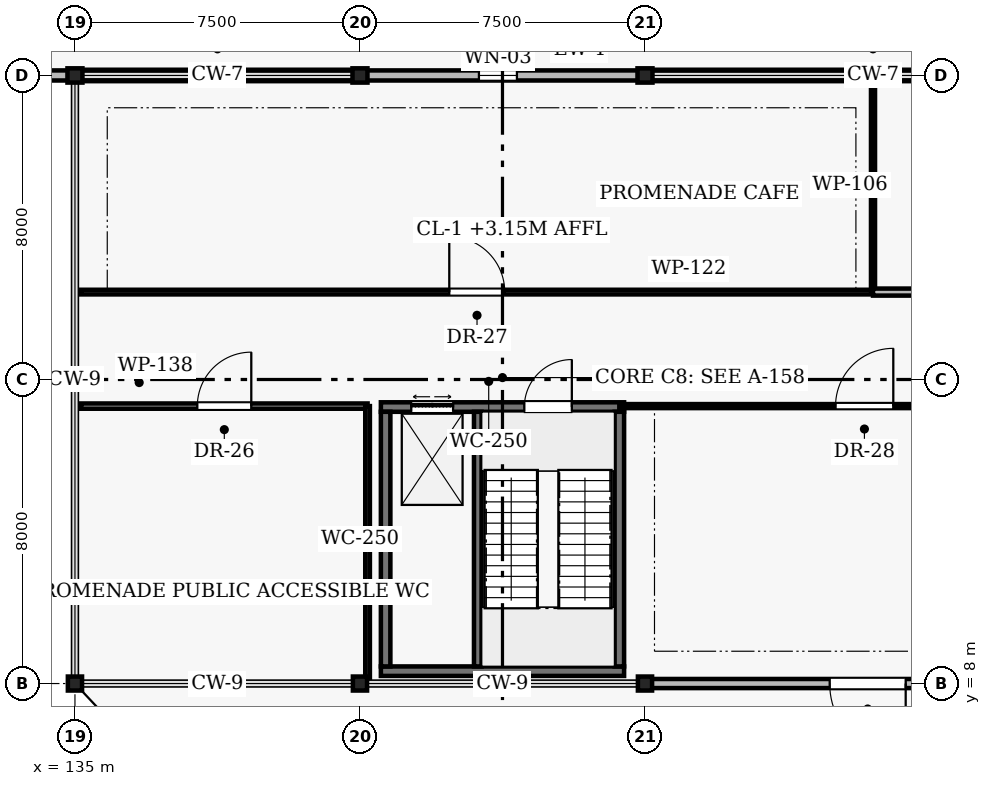
"""IFC4 building model, lengths in metres.
Left out: names, types, materials, properties, quantities, classifications, styles, units other than length and angle.
Written with IfcOpenShell. Run it as: python <this file> out.ifc"""

import sys

from ifc_helpers import new_model, si_unit, direction, frame, frame_2d, origin, origin_2d, place, context, subcontext, project, spatial, rectangle, i_section, extrude, element, fill, save


model = new_model("IFC4")
c1 = context("Model", 3, precision=1e-05, world=origin(), true_north=direction((0.0, 1.0)))
c2 = subcontext(c1, "Body", "Model", "MODEL_VIEW")
j1 = project(units=[si_unit("LENGTHUNIT", "METRE"), si_unit("PLANEANGLEUNIT", "RADIAN")], contexts=[c1])
p1 = place(None, origin())
s1 = spatial("IfcSite", under=j1, at=p1, CompositionType="ELEMENT")
p2 = place(p1, origin())
s2 = spatial("IfcBuilding", under=s1, at=p2, CompositionType="ELEMENT")
p3 = place(p2, origin())
s3 = spatial("IfcBuildingStorey", under=s2, at=p3, CompositionType="ELEMENT", Elevation=0.0)
p4 = place(p3, frame((135.0, 8.0, 0.0), z_axis=(0.0, 0.0, 1.0), x_axis=(1.0, 0.0, 0.0)))
e1 = element("IfcColumn", 1, at=p4, inside=s3, PredefinedType="COLUMN", context=c2, shape_type="SweptSolid", body=[
    extrude(i_section(OverallWidth=0.373, OverallDepth=0.368, WebThickness=0.015, FlangeThickness=0.024, FilletRadius=0.015, at=origin_2d()), origin(), (0.0, 0.0, 1.0), 4.5),
])
p5 = place(p3, frame((135.0, 24.0, 0.0), z_axis=(0.0, 0.0, 1.0), x_axis=(1.0, 0.0, 0.0)))
e2 = element("IfcColumn", 2, at=p5, inside=s3, PredefinedType="COLUMN", context=c2, shape_type="SweptSolid", body=[
    extrude(i_section(OverallWidth=0.394, OverallDepth=0.375, WebThickness=0.021, FlangeThickness=0.033, FilletRadius=0.018, at=origin_2d()), origin(), (0.0, 0.0, 1.0), 4.5),
])
p6 = place(p3, frame((142.5, 8.0, 0.0), z_axis=(0.0, 0.0, 1.0), x_axis=(1.0, 0.0, 0.0)))
e3 = element("IfcColumn", 3, at=p6, inside=s3, PredefinedType="COLUMN", context=c2, shape_type="SweptSolid", body=[
    extrude(i_section(OverallWidth=0.373, OverallDepth=0.368, WebThickness=0.015, FlangeThickness=0.024, FilletRadius=0.015, at=origin_2d()), origin(), (0.0, 0.0, 1.0), 4.5),
])
p7 = place(p3, frame((142.5, 24.0, 0.0), z_axis=(0.0, 0.0, 1.0), x_axis=(1.0, 0.0, 0.0)))
e4 = element("IfcColumn", 4, at=p7, inside=s3, PredefinedType="COLUMN", context=c2, shape_type="SweptSolid", body=[
    extrude(i_section(OverallWidth=0.394, OverallDepth=0.375, WebThickness=0.021, FlangeThickness=0.033, FilletRadius=0.018, at=origin_2d()), origin(), (0.0, 0.0, 1.0), 4.5),
])
p8 = place(p3, frame((150.0, 8.0, 0.0), z_axis=(0.0, 0.0, 1.0), x_axis=(1.0, 0.0, 0.0)))
e5 = element("IfcColumn", 5, at=p8, inside=s3, PredefinedType="COLUMN", context=c2, shape_type="SweptSolid", body=[
    extrude(i_section(OverallWidth=0.373, OverallDepth=0.368, WebThickness=0.015, FlangeThickness=0.024, FilletRadius=0.015, at=origin_2d()), origin(), (0.0, 0.0, 1.0), 4.5),
])
p9 = place(p3, frame((150.0, 24.0, 0.0), z_axis=(0.0, 0.0, 1.0), x_axis=(1.0, 0.0, 0.0)))
e6 = element("IfcColumn", 6, at=p9, inside=s3, PredefinedType="COLUMN", context=c2, shape_type="SweptSolid", body=[
    extrude(i_section(OverallWidth=0.394, OverallDepth=0.375, WebThickness=0.021, FlangeThickness=0.033, FilletRadius=0.018, at=origin_2d()), origin(), (0.0, 0.0, 1.0), 4.5),
])
p10 = place(p3, frame((127.58, 24.0, 0.0), z_axis=(0.0, 0.0, 1.0), x_axis=(1.0, 0.0, 0.0)))
e7 = element("IfcWall", 7, at=p10, inside=s3, PredefinedType="SOLIDWALL", context=c2, shape_type="SweptSolid", body=[
    extrude(rectangle(XDim=7.34, YDim=0.265, at=frame_2d((3.67, 0.0))), origin(), (0.0, 0.0, 1.0), 3.298),
])
p11 = place(p10, frame((3.1, 0.0, 1.2)))
e8 = element("IfcOpeningElement", 8, at=p11, cuts=e7, PredefinedType="OPENING", context=c2, shape_type="SweptSolid", body=[
    extrude(rectangle(XDim=0.9, YDim=1.5, at=frame_2d((0.45, 0.75))), frame((0.0, 0.142, 0.0), z_axis=(0.0, -1.0, 0.0), x_axis=(1.0, 0.0, 0.0)), (0.0, 0.0, 1.0), 0.285),
])
p12 = place(p3, frame((135.08, 24.0, 0.0), z_axis=(0.0, 0.0, 1.0), x_axis=(1.0, 0.0, 0.0)))
e9 = element("IfcWall", 9, at=p12, inside=s3, PredefinedType="SOLIDWALL", context=c2, shape_type="SweptSolid", body=[
    extrude(rectangle(XDim=7.34, YDim=0.3, at=frame_2d((3.67, 0.0))), origin(), (0.0, 0.0, 1.0), 1.1),
])
p13 = place(p3, frame((142.58, 24.0, 0.0), z_axis=(0.0, 0.0, 1.0), x_axis=(1.0, 0.0, 0.0)))
e10 = element("IfcWall", 10, at=p13, inside=s3, PredefinedType="SOLIDWALL", context=c2, shape_type="SweptSolid", body=[
    extrude(rectangle(XDim=7.34, YDim=0.265, at=frame_2d((3.67, 0.0))), origin(), (0.0, 0.0, 1.0), 3.8),
])
p14 = place(p13, frame((3.05, 0.0, 1.2)))
e11 = element("IfcOpeningElement", 11, at=p14, cuts=e10, PredefinedType="OPENING", context=c2, shape_type="SweptSolid", body=[
    extrude(rectangle(XDim=1.0, YDim=1.2, at=frame_2d((0.5, 0.6))), frame((0.0, 0.142, 0.0), z_axis=(0.0, -1.0, 0.0), x_axis=(1.0, 0.0, 0.0)), (0.0, 0.0, 1.0), 0.285),
])
p15 = place(p3, frame((150.08, 24.0, 0.0), z_axis=(0.0, 0.0, 1.0), x_axis=(1.0, 0.0, 0.0)))
e12 = element("IfcWall", 12, at=p15, inside=s3, PredefinedType="SOLIDWALL", context=c2, shape_type="SweptSolid", body=[
    extrude(rectangle(XDim=11.84, YDim=0.3, at=frame_2d((5.92, 0.0))), origin(), (0.0, 0.0, 1.0), 1.1),
])
p16 = place(p3, frame((150.08, 8.0, 0.0), z_axis=(0.0, 0.0, 1.0), x_axis=(1.0, 0.0, 0.0)))
e13 = element("IfcWall", 13, at=p16, inside=s3, PredefinedType="SOLIDWALL", context=c2, shape_type="SweptSolid", body=[
    extrude(rectangle(XDim=11.84, YDim=0.24, at=frame_2d((5.92, 0.0))), origin(), (0.0, 0.0, 1.0), 3.75),
])
p17 = place(p16, frame((4.78, 0.0, 0.0)))
e14 = element("IfcOpeningElement", 14, at=p17, cuts=e13, PredefinedType="OPENING", context=c2, shape_type="SweptSolid", body=[
    extrude(rectangle(XDim=2.0, YDim=2.2, at=frame_2d((1.0, 1.1))), frame((0.0, 0.13, 0.0), z_axis=(0.0, -1.0, 0.0), x_axis=(1.0, 0.0, 0.0)), (0.0, 0.0, 1.0), 0.26),
])
p18 = place(p3, frame((143.05, 8.325, 0.0), z_axis=(0.0, 0.0, 1.0), x_axis=(1.0, 0.0, 0.0)))
e15 = element("IfcWall", 15, at=p18, inside=s3, PredefinedType="SHEAR", context=c2, shape_type="SweptSolid", body=[
    extrude(rectangle(XDim=6.4, YDim=0.25, at=frame_2d((3.2, 0.0))), origin(), (0.0, 0.0, 1.0), 4.5),
])
p19 = place(p3, frame((143.05, 15.275, 0.0), z_axis=(0.0, 0.0, 1.0), x_axis=(1.0, 0.0, 0.0)))
e16 = element("IfcWall", 16, at=p19, inside=s3, PredefinedType="SHEAR", context=c2, shape_type="SweptSolid", body=[
    extrude(rectangle(XDim=6.4, YDim=0.25, at=frame_2d((3.2, 0.0))), origin(), (0.0, 0.0, 1.0), 4.5),
])
p20 = place(p19, frame((0.8, 0.0, 0.0)))
e17 = element("IfcOpeningElement", 17, at=p20, cuts=e16, PredefinedType="OPENING", context=c2, shape_type="SweptSolid", body=[
    extrude(rectangle(XDim=1.1, YDim=2.15, at=frame_2d((0.55, 1.075))), frame((0.0, 0.135, 0.0), z_axis=(0.0, -1.0, 0.0), x_axis=(1.0, 0.0, 0.0)), (0.0, 0.0, 1.0), 0.27),
])
p21 = place(p19, frame((3.775, 0.0, 0.0)))
e18 = element("IfcOpeningElement", 18, at=p21, cuts=e16, PredefinedType="OPENING", context=c2, shape_type="SweptSolid", body=[
    extrude(rectangle(XDim=1.25, YDim=2.15, at=frame_2d((0.625, 1.075))), frame((0.0, 0.135, 0.0), z_axis=(0.0, -1.0, 0.0), x_axis=(1.0, 0.0, 0.0)), (0.0, 0.0, 1.0), 0.27),
])
for number, where, z_axis, x_axis in (
    (19, (143.175, 8.45, 0.0), (0.0, 0.0, 1.0), (0.0, 1.0, 0.0)),
    (20, (149.325, 8.45, 0.0), (0.0, 0.0, 1.0), (0.0, 1.0, 0.0)),
):
    element("IfcWall", number, at=place(p3, frame(where, z_axis=z_axis, x_axis=x_axis)), inside=s3, PredefinedType="SHEAR", context=c2, shape_type="SweptSolid", body=[
        extrude(rectangle(XDim=6.7, YDim=0.25, at=frame_2d((3.35, 0.0))), origin(), (0.0, 0.0, 1.0), 4.5),
    ])
p22 = place(p3, frame((145.6, 8.45, 0.0), z_axis=(0.0, 0.0, 1.0), x_axis=(0.0, 1.0, 0.0)))
e21 = element("IfcWall", 21, at=p22, inside=s3, PredefinedType="SHEAR", context=c2, shape_type="SweptSolid", body=[
    extrude(rectangle(XDim=6.7, YDim=0.2, at=frame_2d((3.35, 0.0))), origin(), (0.0, 0.0, 1.0), 4.5),
])
p23 = place(p3, frame((135.16, 15.3, 0.0), z_axis=(0.0, 0.0, 1.0), x_axis=(1.0, 0.0, 0.0)))
e22 = element("IfcWall", 22, at=p23, inside=s3, PredefinedType="PARTITIONING", context=c2, shape_type="SweptSolid", body=[
    extrude(rectangle(XDim=7.54, YDim=0.138, at=frame_2d((3.77, 0.0))), origin(), (0.0, 0.0, 1.0), 3.7),
])
p24 = place(p23, frame((3.06, 0.0, 0.0)))
e23 = element("IfcOpeningElement", 23, at=p24, cuts=e22, PredefinedType="OPENING", context=c2, shape_type="SweptSolid", body=[
    extrude(rectangle(XDim=1.42, YDim=2.18, at=frame_2d((0.71, 1.09))), frame((0.0, 0.079, 0.0), z_axis=(0.0, -1.0, 0.0), x_axis=(1.0, 0.0, 0.0)), (0.0, 0.0, 1.0), 0.158),
])
p25 = place(p3, frame((142.7, 8.05, 0.0), z_axis=(0.0, 0.0, 1.0), x_axis=(0.0, 1.0, 0.0)))
e24 = element("IfcWall", 24, at=p25, inside=s3, PredefinedType="PARTITIONING", context=c2, shape_type="SweptSolid", body=[
    extrude(rectangle(XDim=7.25, YDim=0.122, at=frame_2d((3.625, 0.0))), origin(), (0.0, 0.0, 1.0), 3.581),
])
p26 = place(p3, frame((135.16, 18.3, 0.0), z_axis=(0.0, 0.0, 1.0), x_axis=(1.0, 0.0, 0.0)))
e25 = element("IfcWall", 25, at=p26, inside=s3, PredefinedType="PARTITIONING", context=c2, shape_type="SweptSolid", body=[
    extrude(rectangle(XDim=20.84, YDim=0.122, at=frame_2d((10.42, 0.0))), origin(), (0.0, 0.0, 1.0), 3.7),
])
p27 = place(p26, frame((9.69, 0.0, 0.0)))
e26 = element("IfcOpeningElement", 26, at=p27, cuts=e25, PredefinedType="OPENING", context=c2, shape_type="SweptSolid", body=[
    extrude(rectangle(XDim=1.46, YDim=2.2, at=frame_2d((0.73, 1.1))), frame((0.0, 0.071, 0.0), z_axis=(0.0, -1.0, 0.0), x_axis=(1.0, 0.0, 0.0)), (0.0, 0.0, 1.0), 0.142),
])
p28 = place(p3, frame((156.0, 18.3, 0.0), z_axis=(0.0, 0.0, 1.0), x_axis=(0.0, 1.0, 0.0)))
e27 = element("IfcWall", 27, at=p28, inside=s3, PredefinedType="PARTITIONING", context=c2, shape_type="SweptSolid", body=[
    extrude(rectangle(XDim=5.62, YDim=0.106, at=frame_2d((2.81, 0.0))), origin(), (0.0, 0.0, 1.0), 3.7),
])
p29 = place(p3, frame((149.325, 15.3, 0.0), z_axis=(0.0, 0.0, 1.0), x_axis=(1.0, 0.0, 0.0)))
e28 = element("IfcWall", 28, at=p29, inside=s3, PredefinedType="PARTITIONING", context=c2, shape_type="SweptSolid", body=[
    extrude(rectangle(XDim=24.275, YDim=0.106, at=frame_2d((12.138, 0.0))), origin(), (0.0, 0.0, 1.0), 3.7),
])
p30 = place(p29, frame((5.689, 0.0, 0.0)))
e29 = element("IfcOpeningElement", 29, at=p30, cuts=e28, PredefinedType="OPENING", context=c2, shape_type="SweptSolid", body=[
    extrude(rectangle(XDim=1.52, YDim=2.18, at=frame_2d((0.76, 1.09))), frame((0.0, 0.063, 0.0), z_axis=(0.0, -1.0, 0.0), x_axis=(1.0, 0.0, 0.0)), (0.0, 0.0, 1.0), 0.126),
])
p31 = place(p3, frame((156.0, 18.3, 0.0), z_axis=(0.0, 0.0, 1.0), x_axis=(1.0, 0.0, 0.0)))
e30 = element("IfcWall", 30, at=p31, inside=s3, PredefinedType="PARTITIONING", context=c2, shape_type="SweptSolid", body=[
    extrude(rectangle(XDim=29.84, YDim=0.185, at=frame_2d((14.92, 0.0))), origin(), (0.0, 0.0, 1.0), 3.7),
])
p32 = place(p31, frame((10.746, 0.0, 0.0)))
e31 = element("IfcOpeningElement", 31, at=p32, cuts=e30, PredefinedType="OPENING", context=c2, shape_type="SweptSolid", body=[
    extrude(rectangle(XDim=1.56, YDim=2.2, at=frame_2d((0.78, 1.1))), frame((0.0, 0.103, 0.0), z_axis=(0.0, -1.0, 0.0), x_axis=(1.0, 0.0, 0.0)), (0.0, 0.0, 1.0), 0.205),
])
p33 = place(p14, origin())
e32 = element("IfcWindow", 32, at=p33, inside=s3, PartitioningType="SINGLE_PANEL", PredefinedType="WINDOW", context=c2, shape_type="SweptSolid", body=[
    extrude(rectangle(XDim=1.0, YDim=1.2, at=frame_2d((0.5, 0.6))), frame((0.0, 0.03, 0.0), z_axis=(0.0, -1.0, 0.0), x_axis=(1.0, 0.0, 0.0)), (0.0, 0.0, 1.0), 0.06),
])
fill(e11, e32)
p34 = place(p17, frame((2.0, 0.0, 0.0), z_axis=(0.0, 0.0, 1.0), x_axis=(-1.0, 0.0, 0.0)))
e33 = element("IfcDoor", 33, at=p34, inside=s3, OperationType="SINGLE_SWING_LEFT", PredefinedType="DOOR", context=c2, shape_type="SweptSolid", body=[
    extrude(rectangle(XDim=2.0, YDim=2.2, at=frame_2d((1.0, 1.1))), frame((0.0, 0.025, 0.0), z_axis=(0.0, -1.0, 0.0), x_axis=(1.0, 0.0, 0.0)), (0.0, 0.0, 1.0), 0.05),
])
fill(e14, e33)
p35 = place(p20, origin())
e34 = element("IfcDoor", 34, at=p35, inside=s3, OperationType="DOUBLE_DOOR_SLIDING", PredefinedType="DOOR", context=c2, shape_type="SweptSolid", body=[
    extrude(rectangle(XDim=1.1, YDim=2.15, at=frame_2d((0.55, 1.075))), frame((0.0, 0.025, 0.0), z_axis=(0.0, -1.0, 0.0), x_axis=(1.0, 0.0, 0.0)), (0.0, 0.0, 1.0), 0.05),
])
fill(e17, e34)
p36 = place(p21, origin())
e35 = element("IfcDoor", 35, at=p36, inside=s3, OperationType="SINGLE_SWING_RIGHT", PredefinedType="DOOR", context=c2, shape_type="SweptSolid", body=[
    extrude(rectangle(XDim=1.25, YDim=2.15, at=frame_2d((0.625, 1.075))), frame((0.0, 0.025, 0.0), z_axis=(0.0, -1.0, 0.0), x_axis=(1.0, 0.0, 0.0)), (0.0, 0.0, 1.0), 0.05),
])
fill(e18, e35)
p37 = place(p24, origin())
e36 = element("IfcDoor", 36, at=p37, inside=s3, OperationType="SINGLE_SWING_RIGHT", PredefinedType="DOOR", context=c2, shape_type="SweptSolid", body=[
    extrude(rectangle(XDim=1.42, YDim=2.18, at=frame_2d((0.71, 1.09))), frame((0.0, 0.025, 0.0), z_axis=(0.0, -1.0, 0.0), x_axis=(1.0, 0.0, 0.0)), (0.0, 0.0, 1.0), 0.05),
])
fill(e23, e36)
p38 = place(p27, origin())
e37 = element("IfcDoor", 37, at=p38, inside=s3, OperationType="SINGLE_SWING_LEFT", PredefinedType="DOOR", context=c2, shape_type="SweptSolid", body=[
    extrude(rectangle(XDim=1.46, YDim=2.2, at=frame_2d((0.73, 1.1))), frame((0.0, 0.025, 0.0), z_axis=(0.0, -1.0, 0.0), x_axis=(1.0, 0.0, 0.0)), (0.0, 0.0, 1.0), 0.05),
])
fill(e26, e37)
p39 = place(p30, origin())
e38 = element("IfcDoor", 38, at=p39, inside=s3, OperationType="SINGLE_SWING_RIGHT", PredefinedType="DOOR", context=c2, shape_type="SweptSolid", body=[
    extrude(rectangle(XDim=1.52, YDim=2.18, at=frame_2d((0.76, 1.09))), frame((0.0, 0.025, 0.0), z_axis=(0.0, -1.0, 0.0), x_axis=(1.0, 0.0, 0.0)), (0.0, 0.0, 1.0), 0.05),
])
fill(e29, e38)
save(model, sys.argv[1])
